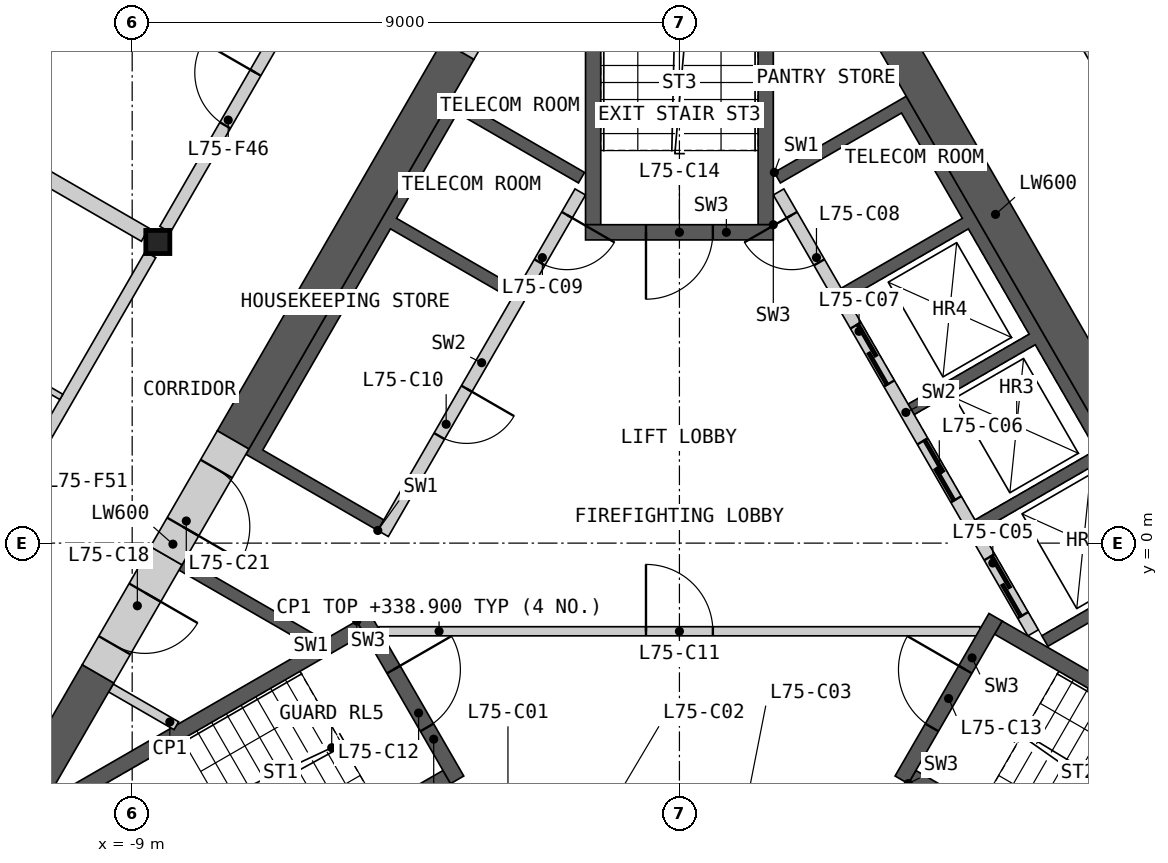
"""IFC4 building model, lengths in metres.
Left out: names, types, materials, properties, quantities, classifications, styles, units other than length and angle.
Written with IfcOpenShell. Run it as: python <this file> out.ifc"""

import sys

from ifc_helpers import new_model, si_unit, direction, frame, frame_2d, origin, origin_2d, place, context, subcontext, project, spatial, polyline, rectangle, i_section, outline, extrude, element, fill, save


model = new_model("IFC4")
c1 = context("Model", 3, precision=1e-05, world=origin(), true_north=direction((0.0, 1.0)))
c2 = subcontext(c1, "Body", "Model", "MODEL_VIEW")
j1 = project(units=[si_unit("LENGTHUNIT", "METRE"), si_unit("PLANEANGLEUNIT", "RADIAN")], contexts=[c1])
p1 = place(None, origin())
s1 = spatial("IfcSite", under=j1, at=p1, CompositionType="ELEMENT")
p2 = place(p1, origin())
s2 = spatial("IfcBuilding", under=s1, at=p2, CompositionType="ELEMENT")
p3 = place(p2, frame((0.0, 0.0, 335.8)))
s3 = spatial("IfcBuildingStorey", under=s2, at=p3, CompositionType="ELEMENT", Elevation=335.8)
p4 = place(p3, frame((-8.578, 4.953, 0.0), z_axis=(0.0, 0.0, 1.0), x_axis=(1.0, 0.0, 0.0)))
e1 = element("IfcColumn", 1, at=p4, inside=s3, PredefinedType="COLUMN", context=c2, shape_type="SweptSolid", body=[
    extrude(i_section(OverallWidth=0.396, OverallDepth=0.381, WebThickness=0.019, FlangeThickness=0.03, at=origin_2d()), origin(), (0.0, 0.0, 1.0), 3.4),
])
p5 = place(p3, origin())
e2 = element("IfcWall", 2, at=p5, inside=s3, PredefinedType="SHEAR", context=c2, shape_type="SweptSolid", body=[
    extrude(outline(polyline([(1.561, 6.097), (3.731, 7.35), (8.231, -0.444), (6.061, -1.697), (5.96, -1.524), (7.952, -0.374), (6.952, 1.358), (4.96, 0.208), (4.861, 0.381), (6.852, 1.531), (5.852, 3.263), (3.861, 2.113), (3.76, 2.287), (5.752, 3.437), (4.752, 5.169), (2.76, 4.019), (2.66, 4.192), (4.652, 5.342), (3.652, 7.074), (1.66, 5.924), (1.561, 6.097)])), origin(), (0.0, 0.0, 1.0), 3.1),
])
p6 = place(p3, frame((5.817, -1.476, 0.0), z_axis=(0.0, 0.0, 1.0), x_axis=(-0.500002616675, 0.866023893041, 0.0)))
e3 = element("IfcWall", 3, at=p6, inside=s3, PredefinedType="SOLIDWALL", context=c2, shape_type="SweptSolid", body=[
    extrude(rectangle(XDim=8.373, YDim=0.2, at=frame_2d((4.187, 0.0))), origin(), (0.0, 0.0, 1.0), 3.1),
])
p7 = place(p6, frame((0.337, 0.0, 0.0)))
e4 = element("IfcOpeningElement", 4, at=p7, cuts=e3, PredefinedType="OPENING", context=c2, shape_type="SweptSolid", body=[
    extrude(rectangle(XDim=1.1, YDim=2.1, at=frame_2d((0.55, 1.05))), frame((0.0, 0.11, 0.0), z_axis=(0.0, -1.0, 0.0), x_axis=(1.0, 0.0, 0.0)), (0.0, 0.0, 1.0), 0.22),
])
p8 = place(p6, frame((2.537, 0.0, 0.0)))
e5 = element("IfcOpeningElement", 5, at=p8, cuts=e3, PredefinedType="OPENING", context=c2, shape_type="SweptSolid", body=[
    extrude(rectangle(XDim=1.1, YDim=2.1, at=frame_2d((0.55, 1.05))), frame((0.0, 0.11, 0.0), z_axis=(0.0, -1.0, 0.0), x_axis=(1.0, 0.0, 0.0)), (0.0, 0.0, 1.0), 0.22),
])
p9 = place(p6, frame((4.737, 0.0, 0.0)))
e6 = element("IfcOpeningElement", 6, at=p9, cuts=e3, PredefinedType="OPENING", context=c2, shape_type="SweptSolid", body=[
    extrude(rectangle(XDim=1.1, YDim=2.1, at=frame_2d((0.55, 1.05))), frame((0.0, 0.11, 0.0), z_axis=(0.0, -1.0, 0.0), x_axis=(1.0, 0.0, 0.0)), (0.0, 0.0, 1.0), 0.22),
])
p10 = place(p6, frame((7.037, 0.0, 0.0)))
e7 = element("IfcOpeningElement", 7, at=p10, cuts=e3, PredefinedType="OPENING", context=c2, shape_type="SweptSolid", body=[
    extrude(rectangle(XDim=0.9, YDim=2.1, at=frame_2d((0.45, 1.05))), frame((0.0, 0.11, 0.0), z_axis=(0.0, -1.0, 0.0), x_axis=(1.0, 0.0, 0.0)), (0.0, 0.0, 1.0), 0.22),
])
p11 = place(p3, origin())
e8 = element("IfcWall", 8, at=p11, inside=s3, PredefinedType="SHEAR", context=c2, shape_type="SweptSolid", body=[
    extrude(outline(polyline([(-6.061, -1.697), (-8.231, -0.444), (-8.131, -0.271), (-5.96, -1.524), (-6.061, -1.697)])), origin(), (0.0, 0.0, 1.0), 3.1),
])
p12 = place(p3, origin())
e9 = element("IfcWall", 9, at=p12, inside=s3, PredefinedType="SHEAR", context=c2, shape_type="SweptSolid", body=[
    extrude(outline(polyline([(-4.96, 0.208), (-7.131, 1.461), (-3.731, 7.35), (-1.561, 6.097), (-1.66, 5.924), (-3.652, 7.074), (-4.652, 5.342), (-2.66, 4.192), (-2.76, 4.019), (-4.752, 5.169), (-6.852, 1.531), (-4.861, 0.381), (-4.96, 0.208)])), origin(), (0.0, 0.0, 1.0), 3.1),
])
p13 = place(p3, frame((-1.631, 5.776, 0.0), z_axis=(0.0, 0.0, 1.0), x_axis=(-0.499992876559, -0.866029516466, 0.0)))
e10 = element("IfcWall", 10, at=p13, inside=s3, PredefinedType="SOLIDWALL", context=c2, shape_type="SweptSolid", body=[
    extrude(rectangle(XDim=6.486, YDim=0.2, at=frame_2d((3.243, 0.0))), origin(), (0.0, 0.0, 1.0), 3.1),
])
p14 = place(p13, frame((0.437, 0.0, 0.0)))
e11 = element("IfcOpeningElement", 11, at=p14, cuts=e10, PredefinedType="OPENING", context=c2, shape_type="SweptSolid", body=[
    extrude(rectangle(XDim=0.9, YDim=2.1, at=frame_2d((0.45, 1.05))), frame((0.0, 0.11, 0.0), z_axis=(0.0, -1.0, 0.0), x_axis=(1.0, 0.0, 0.0)), (0.0, 0.0, 1.0), 0.22),
])
p15 = place(p13, frame((3.737, 0.0, 0.0)))
e12 = element("IfcOpeningElement", 12, at=p15, cuts=e10, PredefinedType="OPENING", context=c2, shape_type="SweptSolid", body=[
    extrude(rectangle(XDim=0.9, YDim=2.1, at=frame_2d((0.45, 1.05))), frame((0.0, 0.11, 0.0), z_axis=(0.0, -1.0, 0.0), x_axis=(1.0, 0.0, 0.0)), (0.0, 0.0, 1.0), 0.22),
])
p16 = place(p3, frame((-4.941, -1.45, 0.0), z_axis=(0.0, 0.0, 1.0), x_axis=(1.0, 0.0, 0.0)))
e13 = element("IfcWall", 13, at=p16, inside=s3, PredefinedType="PARTITIONING", context=c2, shape_type="SweptSolid", body=[
    extrude(rectangle(XDim=9.882, YDim=0.15, at=frame_2d((4.941, 0.0))), origin(), (0.0, 0.0, 1.0), 3.1),
])
p17 = place(p16, frame((4.391, 0.0, 0.0)))
e14 = element("IfcOpeningElement", 14, at=p17, cuts=e13, PredefinedType="OPENING", context=c2, shape_type="SweptSolid", body=[
    extrude(rectangle(XDim=1.1, YDim=2.1, at=frame_2d((0.55, 1.05))), frame((0.0, 0.085, 0.0), z_axis=(0.0, -1.0, 0.0), x_axis=(1.0, 0.0, 0.0)), (0.0, 0.0, 1.0), 0.17),
])
p18 = place(p3, origin())
e15 = element("IfcWall", 15, at=p18, inside=s3, PredefinedType="SHEAR", context=c2, shape_type="SweptSolid", body=[
    extrude(outline(polyline([(-5.307, -1.281), (-10.374, -4.206), (-10.032, -4.298), (-5.182, -1.498), (-5.307, -1.281)])), origin(), (0.0, 0.0, 1.0), 3.1),
])
p19 = place(p3, origin())
e16 = element("IfcWall", 16, at=p19, inside=s3, PredefinedType="SHEAR", context=c2, shape_type="SweptSolid", body=[
    extrude(outline(polyline([(-8.738, -6.539), (-8.83, -6.881), (-3.763, -3.956), (-3.888, -3.739), (-8.738, -6.539)])), origin(), (0.0, 0.0, 1.0), 3.1),
])
p20 = place(p3, frame((-5.199, -1.219, 0.0), z_axis=(0.0, 0.0, 1.0), x_axis=(0.499982516597, -0.866035497597, 0.0)))
e17 = element("IfcWall", 17, at=p20, inside=s3, PredefinedType="SHEAR", context=c2, shape_type="SweptSolid", body=[
    extrude(rectangle(XDim=3.088, YDim=0.25, at=frame_2d((1.544, 0.0))), origin(), (0.0, 0.0, 1.0), 3.1),
])
p21 = place(p20, frame((0.994, 0.0, 0.0)))
e18 = element("IfcOpeningElement", 18, at=p21, cuts=e17, PredefinedType="OPENING", context=c2, shape_type="SweptSolid", body=[
    extrude(rectangle(XDim=1.1, YDim=2.1, at=frame_2d((0.55, 1.05))), frame((0.0, 0.135, 0.0), z_axis=(0.0, -1.0, 0.0), x_axis=(1.0, 0.0, 0.0)), (0.0, 0.0, 1.0), 0.27),
])
p22 = place(p3, origin())
e19 = element("IfcWall", 19, at=p22, inside=s3, PredefinedType="SHEAR", context=c2, shape_type="SweptSolid", body=[
    extrude(outline(polyline([(3.763, -3.956), (8.83, -6.881), (8.738, -6.539), (3.888, -3.739), (3.763, -3.956)])), origin(), (0.0, 0.0, 1.0), 3.1),
])
p23 = place(p3, origin())
e20 = element("IfcWall", 20, at=p23, inside=s3, PredefinedType="SHEAR", context=c2, shape_type="SweptSolid", body=[
    extrude(outline(polyline([(10.032, -4.298), (10.374, -4.206), (5.307, -1.281), (5.182, -1.498), (10.032, -4.298)])), origin(), (0.0, 0.0, 1.0), 3.1),
])
p24 = place(p3, frame((3.655, -3.893, 0.0), z_axis=(0.0, 0.0, 1.0), x_axis=(0.499982516597, 0.866035497597, 0.0)))
e21 = element("IfcWall", 21, at=p24, inside=s3, PredefinedType="SHEAR", context=c2, shape_type="SweptSolid", body=[
    extrude(rectangle(XDim=3.088, YDim=0.25, at=frame_2d((1.544, 0.0))), origin(), (0.0, 0.0, 1.0), 3.1),
])
p25 = place(p24, frame((0.994, 0.0, 0.0)))
e22 = element("IfcOpeningElement", 22, at=p25, cuts=e21, PredefinedType="OPENING", context=c2, shape_type="SweptSolid", body=[
    extrude(rectangle(XDim=1.1, YDim=2.1, at=frame_2d((0.55, 1.05))), frame((0.0, 0.135, 0.0), z_axis=(0.0, -1.0, 0.0), x_axis=(1.0, 0.0, 0.0)), (0.0, 0.0, 1.0), 0.27),
])
p26 = place(p3, origin())
e23 = element("IfcWall", 23, at=p26, inside=s3, PredefinedType="SHEAR", context=c2, shape_type="SweptSolid", body=[
    extrude(outline(polyline([(1.544, 5.237), (1.544, 11.087), (1.294, 10.837), (1.294, 5.237), (1.544, 5.237)])), origin(), (0.0, 0.0, 1.0), 3.1),
])
p27 = place(p3, origin())
e24 = element("IfcWall", 24, at=p27, inside=s3, PredefinedType="SHEAR", context=c2, shape_type="SweptSolid", body=[
    extrude(outline(polyline([(-1.294, 10.837), (-1.544, 11.087), (-1.544, 5.237), (-1.294, 5.237), (-1.294, 10.837)])), origin(), (0.0, 0.0, 1.0), 3.1),
])
p28 = place(p3, frame((1.544, 5.112, 0.0), z_axis=(0.0, 0.0, 1.0), x_axis=(-1.0, 0.0, 0.0)))
e25 = element("IfcWall", 25, at=p28, inside=s3, PredefinedType="SHEAR", context=c2, shape_type="SweptSolid", body=[
    extrude(rectangle(XDim=3.088, YDim=0.25, at=frame_2d((1.544, 0.0))), origin(), (0.0, 0.0, 1.0), 3.1),
])
p29 = place(p28, frame((0.994, 0.0, 0.0)))
e26 = element("IfcOpeningElement", 26, at=p29, cuts=e25, PredefinedType="OPENING", context=c2, shape_type="SweptSolid", body=[
    extrude(rectangle(XDim=1.1, YDim=2.1, at=frame_2d((0.55, 1.05))), frame((0.0, 0.135, 0.0), z_axis=(0.0, -1.0, 0.0), x_axis=(1.0, 0.0, 0.0)), (0.0, 0.0, 1.0), 0.27),
])
p30 = place(p3, frame((-9.35, -2.383, 0.0), z_axis=(0.0, 0.0, 1.0), x_axis=(0.866057962423, -0.499943602543, 0.0)))
e27 = element("IfcWall", 27, at=p30, inside=s3, PredefinedType="PARTITIONING", context=c2, shape_type="SweptSolid", body=[
    extrude(rectangle(XDim=1.242, YDim=0.15, at=frame_2d((0.621, 0.0))), origin(), (0.0, 0.0, 1.0), 3.1),
])
p31 = place(p3, frame((8.841, -0.902, 0.0), z_axis=(0.0, 0.0, 1.0), x_axis=(-0.499995618375, 0.866027933502, 0.0)))
e28 = element("IfcWall", 28, at=p31, inside=s3, PredefinedType="SHEAR", context=c2, shape_type="SweptSolid", body=[
    extrude(rectangle(XDim=14.571, YDim=0.6, at=frame_2d((7.285, 0.0))), origin(), (0.0, 0.0, 1.0), 3.1),
])
p32 = place(p3, frame((-3.639, 8.107, 0.0), z_axis=(0.0, 0.0, 1.0), x_axis=(-0.49999180351, -0.866030135978, 0.0)))
e29 = element("IfcWall", 29, at=p32, inside=s3, PredefinedType="SHEAR", context=c2, shape_type="SweptSolid", body=[
    extrude(rectangle(XDim=7.401, YDim=0.6, at=frame_2d((3.701, 0.0))), origin(), (0.0, 0.0, 1.0), 3.1),
])
p33 = place(p3, frame((-9.562, -2.15, 0.0), z_axis=(0.0, 0.0, 1.0), x_axis=(-0.500015214976, -0.866016619236, 0.0)))
e30 = element("IfcWall", 30, at=p33, inside=s3, PredefinedType="SHEAR", context=c2, shape_type="SweptSolid", body=[
    extrude(rectangle(XDim=5.318, YDim=0.6, at=frame_2d((2.659, 0.0))), origin(), (0.0, 0.0, 1.0), 3.1),
])
p34 = place(p3, frame((-8.44, -0.208, 0.0), z_axis=(0.0, 0.0, 1.0), x_axis=(-0.500001951578, -0.866024277037, 0.0)))
e31 = element("IfcWall", 31, at=p34, inside=s3, PredefinedType="SHEAR", context=c2, shape_type="SweptSolid", body=[
    extrude(rectangle(XDim=2.243, YDim=0.6, at=frame_2d((1.122, 0.0))), origin(), (0.0, 0.0, 1.0), 3.1),
])
p35 = place(p34, frame((0.7, 0.0, 0.0)))
e32 = element("IfcOpeningElement", 32, at=p35, cuts=e31, PredefinedType="OPENING", context=c2, shape_type="SweptSolid", body=[
    extrude(rectangle(XDim=1.0, YDim=2.1, at=frame_2d((0.5, 1.05))), frame((0.0, 0.31, 0.0), z_axis=(0.0, -1.0, 0.0), x_axis=(1.0, 0.0, 0.0)), (0.0, 0.0, 1.0), 0.62),
])
p36 = place(p3, frame((-2.539, 10.013, 0.0), z_axis=(0.0, 0.0, 1.0), x_axis=(-0.50002983664, -0.866008176907, 0.0)))
e33 = element("IfcWall", 33, at=p36, inside=s3, PredefinedType="SHEAR", context=c2, shape_type="SweptSolid", body=[
    extrude(rectangle(XDim=2.2, YDim=0.6, at=frame_2d((1.1, 0.0))), origin(), (0.0, 0.0, 1.0), 3.1),
])
p37 = place(p36, frame((0.6, 0.0, 0.0)))
e34 = element("IfcOpeningElement", 34, at=p37, cuts=e33, PredefinedType="OPENING", context=c2, shape_type="SweptSolid", body=[
    extrude(rectangle(XDim=1.0, YDim=2.1, at=frame_2d((0.5, 1.05))), frame((0.0, 0.31, 0.0), z_axis=(0.0, -1.0, 0.0), x_axis=(1.0, 0.0, 0.0)), (0.0, 0.0, 1.0), 0.62),
])
p38 = place(p3, frame((-7.34, 1.698, 0.0), z_axis=(0.0, 0.0, 1.0), x_axis=(-0.50002983664, -0.866008176907, 0.0)))
e35 = element("IfcWall", 35, at=p38, inside=s3, PredefinedType="SHEAR", context=c2, shape_type="SweptSolid", body=[
    extrude(rectangle(XDim=2.2, YDim=0.6, at=frame_2d((1.1, 0.0))), origin(), (0.0, 0.0, 1.0), 3.1),
])
p39 = place(p38, frame((0.55, 0.0, 0.0)))
e36 = element("IfcOpeningElement", 36, at=p39, cuts=e35, PredefinedType="OPENING", context=c2, shape_type="SweptSolid", body=[
    extrude(rectangle(XDim=1.1, YDim=2.1, at=frame_2d((0.55, 1.05))), frame((0.0, 0.31, 0.0), z_axis=(0.0, -1.0, 0.0), x_axis=(1.0, 0.0, 0.0)), (0.0, 0.0, 1.0), 0.62),
])
p40 = place(p3, frame((-19.615, 11.325, 0.0), z_axis=(0.0, 0.0, 1.0), x_axis=(0.86602139559, -0.500006942333, 0.0)))
e37 = element("IfcWall", 37, at=p40, inside=s3, PredefinedType="PARTITIONING", context=c2, shape_type="SweptSolid", body=[
    extrude(rectangle(XDim=12.505, YDim=0.25, at=frame_2d((6.252, 0.0))), origin(), (0.0, 0.0, 1.0), 2.33),
])
p41 = place(p3, frame((4.409, 12.174, 0.0), z_axis=(0.0, 0.0, 1.0), x_axis=(0.499984266882, -0.866034487114, 0.0)))
e38 = element("IfcWall", 38, at=p41, inside=s3, PredefinedType="PARTITIONING", context=c2, shape_type="SweptSolid", body=[
    extrude(rectangle(XDim=8.099, YDim=0.2, at=frame_2d((4.049, 0.0))), origin(), (0.0, 0.0, 1.0), 3.1),
])
p42 = place(p41, frame((1.164, 0.0, 0.0)))
e39 = element("IfcOpeningElement", 39, at=p42, cuts=e38, PredefinedType="OPENING", context=c2, shape_type="SweptSolid", body=[
    extrude(rectangle(XDim=1.0, YDim=2.1, at=frame_2d((0.5, 1.05))), frame((0.0, 0.11, 0.0), z_axis=(0.0, -1.0, 0.0), x_axis=(1.0, 0.0, 0.0)), (0.0, 0.0, 1.0), 0.22),
])
p43 = place(p3, frame((-8.458, 5.16, 0.0), z_axis=(0.0, 0.0, 1.0), x_axis=(0.499984266882, 0.866034487114, 0.0)))
e40 = element("IfcWall", 40, at=p43, inside=s3, PredefinedType="PARTITIONING", context=c2, shape_type="SweptSolid", body=[
    extrude(rectangle(XDim=8.099, YDim=0.2, at=frame_2d((4.049, 0.0))), origin(), (0.0, 0.0, 1.0), 3.1),
])
p44 = place(p43, frame((1.976, 0.0, 0.0)))
e41 = element("IfcOpeningElement", 41, at=p44, cuts=e40, PredefinedType="OPENING", context=c2, shape_type="SweptSolid", body=[
    extrude(rectangle(XDim=1.0, YDim=2.1, at=frame_2d((0.5, 1.05))), frame((0.0, 0.11, 0.0), z_axis=(0.0, -1.0, 0.0), x_axis=(1.0, 0.0, 0.0)), (0.0, 0.0, 1.0), 0.22),
])
p45 = place(p3, frame((-12.748, -2.269, 0.0), z_axis=(0.0, 0.0, 1.0), x_axis=(0.499984266882, 0.866034487114, 0.0)))
e42 = element("IfcWall", 42, at=p45, inside=s3, PredefinedType="PARTITIONING", context=c2, shape_type="SweptSolid", body=[
    extrude(rectangle(XDim=8.099, YDim=0.2, at=frame_2d((4.049, 0.0))), origin(), (0.0, 0.0, 1.0), 3.1),
])
p46 = place(p45, frame((3.702, 0.0, 0.0)))
e43 = element("IfcOpeningElement", 43, at=p46, cuts=e42, PredefinedType="OPENING", context=c2, shape_type="SweptSolid", body=[
    extrude(rectangle(XDim=1.0, YDim=2.1, at=frame_2d((0.5, 1.05))), frame((0.0, 0.11, 0.0), z_axis=(0.0, -1.0, 0.0), x_axis=(1.0, 0.0, 0.0)), (0.0, 0.0, 1.0), 0.22),
])
p47 = place(p3, frame((-15.318, 5.38, 0.0), z_axis=(0.0, 0.0, 1.0), x_axis=(0.866035260786, -0.499982926783, 0.0)))
e44 = element("IfcWall", 44, at=p47, inside=s3, PredefinedType="PARTITIONING", context=c2, shape_type="SweptSolid", body=[
    extrude(rectangle(XDim=5.95, YDim=0.1, at=frame_2d((2.975, 0.0))), origin(), (0.0, 0.0, 1.0), 2.33),
])
p48 = place(p7, origin())
e45 = element("IfcDoor", 45, at=p48, inside=s3, OperationType="SLIDING_TO_LEFT", PredefinedType="DOOR", context=c2, shape_type="SweptSolid", body=[
    extrude(rectangle(XDim=1.1, YDim=2.1, at=frame_2d((0.55, 1.05))), frame((0.0, 0.025, 0.0), z_axis=(0.0, -1.0, 0.0), x_axis=(1.0, 0.0, 0.0)), (0.0, 0.0, 1.0), 0.05),
])
fill(e4, e45)
p49 = place(p8, origin())
e46 = element("IfcDoor", 46, at=p49, inside=s3, OperationType="SLIDING_TO_LEFT", PredefinedType="DOOR", context=c2, shape_type="SweptSolid", body=[
    extrude(rectangle(XDim=1.1, YDim=2.1, at=frame_2d((0.55, 1.05))), frame((0.0, 0.025, 0.0), z_axis=(0.0, -1.0, 0.0), x_axis=(1.0, 0.0, 0.0)), (0.0, 0.0, 1.0), 0.05),
])
fill(e5, e46)
p50 = place(p9, origin())
e47 = element("IfcDoor", 47, at=p50, inside=s3, OperationType="SLIDING_TO_LEFT", PredefinedType="DOOR", context=c2, shape_type="SweptSolid", body=[
    extrude(rectangle(XDim=1.1, YDim=2.1, at=frame_2d((0.55, 1.05))), frame((0.0, 0.025, 0.0), z_axis=(0.0, -1.0, 0.0), x_axis=(1.0, 0.0, 0.0)), (0.0, 0.0, 1.0), 0.05),
])
fill(e6, e47)
p51 = place(p10, origin())
e48 = element("IfcDoor", 48, at=p51, inside=s3, OperationType="SINGLE_SWING_RIGHT", PredefinedType="DOOR", context=c2, shape_type="SweptSolid", body=[
    extrude(rectangle(XDim=0.9, YDim=2.1, at=frame_2d((0.45, 1.05))), frame((0.0, 0.025, 0.0), z_axis=(0.0, -1.0, 0.0), x_axis=(1.0, 0.0, 0.0)), (0.0, 0.0, 1.0), 0.05),
])
fill(e7, e48)
p52 = place(p14, origin())
e49 = element("IfcDoor", 49, at=p52, inside=s3, OperationType="SINGLE_SWING_LEFT", PredefinedType="DOOR", context=c2, shape_type="SweptSolid", body=[
    extrude(rectangle(XDim=0.9, YDim=2.1, at=frame_2d((0.45, 1.05))), frame((0.0, 0.025, 0.0), z_axis=(0.0, -1.0, 0.0), x_axis=(1.0, 0.0, 0.0)), (0.0, 0.0, 1.0), 0.05),
])
fill(e11, e49)
p53 = place(p15, origin())
e50 = element("IfcDoor", 50, at=p53, inside=s3, OperationType="SINGLE_SWING_LEFT", PredefinedType="DOOR", context=c2, shape_type="SweptSolid", body=[
    extrude(rectangle(XDim=0.9, YDim=2.1, at=frame_2d((0.45, 1.05))), frame((0.0, 0.025, 0.0), z_axis=(0.0, -1.0, 0.0), x_axis=(1.0, 0.0, 0.0)), (0.0, 0.0, 1.0), 0.05),
])
fill(e12, e50)
p54 = place(p17, origin())
e51 = element("IfcDoor", 51, at=p54, inside=s3, OperationType="SINGLE_SWING_LEFT", PredefinedType="DOOR", context=c2, shape_type="SweptSolid", body=[
    extrude(rectangle(XDim=1.1, YDim=2.1, at=frame_2d((0.55, 1.05))), frame((0.0, 0.025, 0.0), z_axis=(0.0, -1.0, 0.0), x_axis=(1.0, 0.0, 0.0)), (0.0, 0.0, 1.0), 0.05),
])
fill(e14, e51)
p55 = place(p21, origin())
e52 = element("IfcDoor", 52, at=p55, inside=s3, OperationType="SINGLE_SWING_LEFT", PredefinedType="DOOR", context=c2, shape_type="SweptSolid", body=[
    extrude(rectangle(XDim=1.1, YDim=2.1, at=frame_2d((0.55, 1.05))), frame((0.0, 0.025, 0.0), z_axis=(0.0, -1.0, 0.0), x_axis=(1.0, 0.0, 0.0)), (0.0, 0.0, 1.0), 0.05),
])
fill(e18, e52)
p56 = place(p25, origin())
e53 = element("IfcDoor", 53, at=p56, inside=s3, OperationType="SINGLE_SWING_RIGHT", PredefinedType="DOOR", context=c2, shape_type="SweptSolid", body=[
    extrude(rectangle(XDim=1.1, YDim=2.1, at=frame_2d((0.55, 1.05))), frame((0.0, 0.025, 0.0), z_axis=(0.0, -1.0, 0.0), x_axis=(1.0, 0.0, 0.0)), (0.0, 0.0, 1.0), 0.05),
])
fill(e22, e53)
p57 = place(p29, origin())
e54 = element("IfcDoor", 54, at=p57, inside=s3, OperationType="SINGLE_SWING_RIGHT", PredefinedType="DOOR", context=c2, shape_type="SweptSolid", body=[
    extrude(rectangle(XDim=1.1, YDim=2.1, at=frame_2d((0.55, 1.05))), frame((0.0, 0.025, 0.0), z_axis=(0.0, -1.0, 0.0), x_axis=(1.0, 0.0, 0.0)), (0.0, 0.0, 1.0), 0.05),
])
fill(e26, e54)
p58 = place(p35, origin())
e55 = element("IfcDoor", 55, at=p58, inside=s3, OperationType="SINGLE_SWING_LEFT", PredefinedType="DOOR", context=c2, shape_type="SweptSolid", body=[
    extrude(rectangle(XDim=1.0, YDim=2.1, at=frame_2d((0.5, 1.05))), frame((0.0, 0.055, 0.0), z_axis=(0.0, -1.0, 0.0), x_axis=(1.0, 0.0, 0.0)), (0.0, 0.0, 1.0), 0.05),
])
fill(e32, e55)
p59 = place(p39, origin())
e56 = element("IfcDoor", 56, at=p59, inside=s3, OperationType="SINGLE_SWING_RIGHT", PredefinedType="DOOR", context=c2, shape_type="SweptSolid", body=[
    extrude(rectangle(XDim=1.1, YDim=2.1, at=frame_2d((0.55, 1.05))), frame((0.0, 0.055, 0.0), z_axis=(0.0, -1.0, 0.0), x_axis=(1.0, 0.0, 0.0)), (0.0, 0.0, 1.0), 0.05),
])
fill(e36, e56)
p60 = place(p44, origin())
e57 = element("IfcDoor", 57, at=p60, inside=s3, OperationType="SINGLE_SWING_RIGHT", PredefinedType="DOOR", context=c2, shape_type="SweptSolid", body=[
    extrude(rectangle(XDim=1.0, YDim=2.1, at=frame_2d((0.5, 1.05))), frame((0.0, 0.025, 0.0), z_axis=(0.0, -1.0, 0.0), x_axis=(1.0, 0.0, 0.0)), (0.0, 0.0, 1.0), 0.05),
])
fill(e41, e57)
save(model, sys.argv[1])
